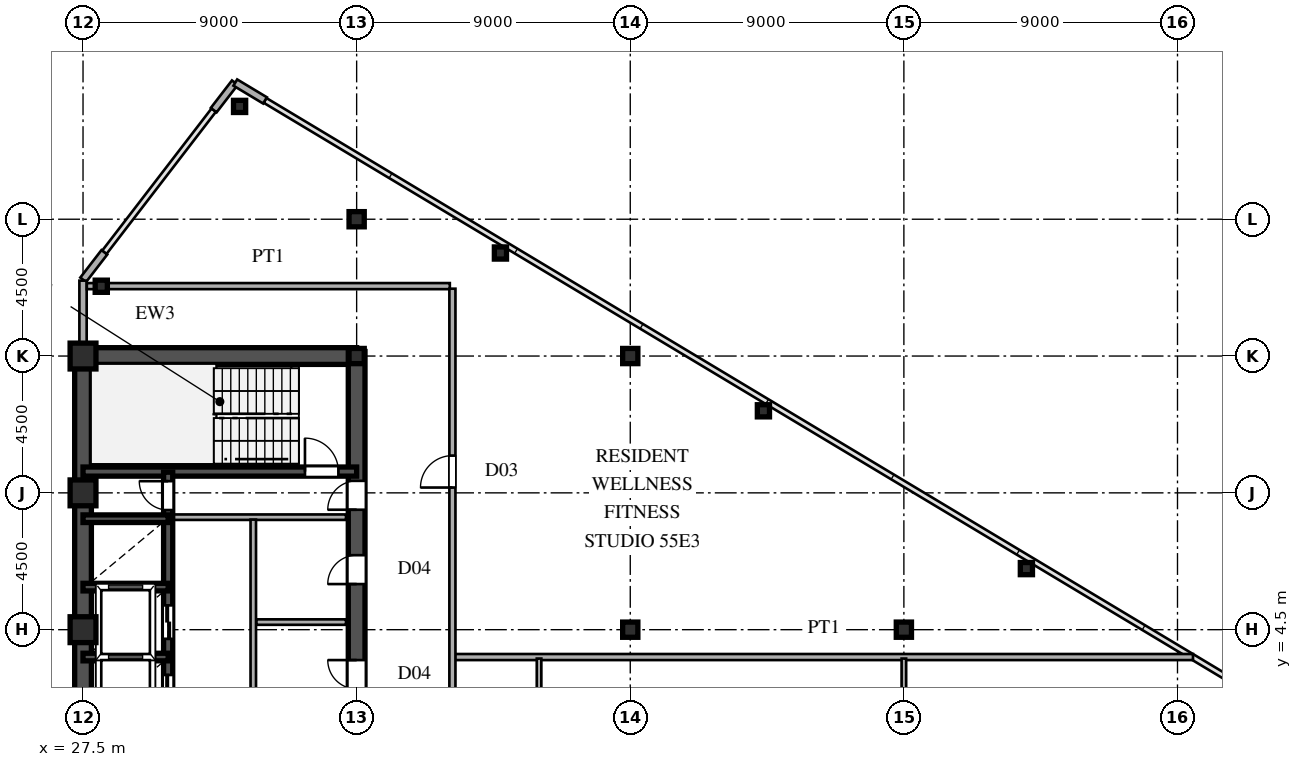
"""IFC4 building model, lengths in metres.
Left out: names, types, materials, properties, quantities, classifications, styles, units other than length and angle.
Written with IfcOpenShell. Run it as: python <this file> out.ifc"""

import sys

from ifc_helpers import new_model, si_unit, direction, frame, frame_2d, origin, origin_2d, place, context, subcontext, project, spatial, rectangle, hollow_rectangle, i_section, extrude, source, transform, mapped, element, fill, save


model = new_model("IFC4")
c1 = context("Model", 3, precision=1e-05, world=origin(), true_north=direction((0.0, 1.0)))
c2 = subcontext(c1, "Body", "Model", "MODEL_VIEW")
j1 = project(units=[si_unit("LENGTHUNIT", "METRE"), si_unit("PLANEANGLEUNIT", "RADIAN")], contexts=[c1])
p1 = place(None, origin())
s1 = spatial("IfcSite", under=j1, at=p1, CompositionType="ELEMENT")
p2 = place(p1, origin())
s2 = spatial("IfcBuilding", under=s1, at=p2, CompositionType="ELEMENT")
p3 = place(p2, frame((0.0, 0.0, 206.7)))
s3 = spatial("IfcBuildingStorey", under=s2, at=p3, CompositionType="ELEMENT", Elevation=206.7)
m1 = source(origin(), c2, "Body", "SweptSolid", [
    extrude(hollow_rectangle(XDim=0.85, YDim=0.85, WallThickness=0.036, at=origin_2d()), origin(), (0.0, 0.0, 1.0), 3.6),
])
for number, where, z_axis, x_axis in (
    (1, (27.5, 4.5, 0.0), (0.0, 0.0, 1.0), (1.0, 0.0, 0.0)),
    (2, (27.5, 9.0, 0.0), (0.0, 0.0, 1.0), (1.0, 0.0, 0.0)),
    (3, (27.5, 13.5, 0.0), (0.0, 0.0, 1.0), (1.0, 0.0, 0.0)),
):
    element("IfcColumn", number, at=place(p3, frame(where, z_axis=z_axis, x_axis=x_axis)), inside=s3, PredefinedType="COLUMN", context=c2, shape_type="MappedRepresentation", body=[
        mapped(m1, transform((0.0, 0.0, 0.0), scale=1.0)),
    ])
m2 = source(origin(), c2, "Body", "SweptSolid", [
    extrude(i_section(OverallWidth=0.5, OverallDepth=0.5, WebThickness=0.02, FlangeThickness=0.032, at=origin_2d()), origin(), (0.0, 0.0, 1.0), 3.6),
])
for number, where, z_axis, x_axis in (
    (4, (36.5, 13.5, 0.0), (0.0, 0.0, 1.0), (1.0, 0.0, 0.0)),
    (5, (36.5, 18.0, 0.0), (0.0, 0.0, 1.0), (1.0, 0.0, 0.0)),
    (6, (45.5, 4.5, 0.0), (0.0, 0.0, 1.0), (1.0, 0.0, 0.0)),
    (7, (45.5, 13.5, 0.0), (0.0, 0.0, 1.0), (1.0, 0.0, 0.0)),
    (8, (54.5, 4.5, 0.0), (0.0, 0.0, 1.0), (1.0, 0.0, 0.0)),
):
    element("IfcColumn", number, at=place(p3, frame(where, z_axis=z_axis, x_axis=x_axis)), inside=s3, PredefinedType="COLUMN", context=c2, shape_type="MappedRepresentation", body=[
        mapped(m2, transform((0.0, 0.0, 0.0), scale=1.0)),
    ])
m3 = source(origin(), c2, "Body", "SweptSolid", [
    extrude(hollow_rectangle(XDim=0.4, YDim=0.4, WallThickness=0.016, at=origin_2d()), origin(), (0.0, 0.0, 1.0), 3.6),
])
for number, where, z_axis, x_axis in (
    (9, (32.65, 21.71, 0.0), (0.0, 0.0, 1.0), (1.0, 0.0, 0.0)),
    (10, (28.1, 15.796, 0.0), (0.0, 0.0, 1.0), (1.0, 0.0, 0.0)),
    (11, (41.23, 16.889, 0.0), (0.0, 0.0, 1.0), (1.0, 0.0, 0.0)),
    (12, (49.88, 11.699, 0.0), (0.0, 0.0, 1.0), (1.0, 0.0, 0.0)),
    (13, (58.53, 6.509, 0.0), (0.0, 0.0, 1.0), (1.0, 0.0, 0.0)),
):
    element("IfcColumn", number, at=place(p3, frame(where, z_axis=z_axis, x_axis=x_axis)), inside=s3, PredefinedType="COLUMN", context=c2, shape_type="MappedRepresentation", body=[
        mapped(m3, transform((0.0, 0.0, 0.0), scale=1.0)),
    ])
for number, where, z_axis, x_axis in (
    (14, (33.486, 21.908, 0.0), (0.0, 0.0, 1.0), (-0.857, 0.515, 0.0)),
    (15, (32.494, 22.492, 0.0), (0.0, 0.0, 1.0), (-0.61, -0.793, 0.0)),
    (16, (28.201, 16.912, 0.0), (0.0, 0.0, 1.0), (-0.61, -0.793, 0.0)),
):
    element("IfcWall", number, at=place(p3, frame(where, z_axis=z_axis, x_axis=x_axis)), inside=s3, PredefinedType="SOLIDWALL", context=c2, shape_type="SweptSolid", body=[
        extrude(rectangle(XDim=1.14, YDim=0.24, at=frame_2d((0.57, 0.0))), origin(), (0.0, 0.0, 1.0), 3.38),
    ])
p4 = place(p3, frame((27.5, 13.78, 0.0), z_axis=(0.0, 0.0, 1.0), x_axis=(0.0, 1.0, 0.0)))
e17 = element("IfcWall", 17, at=p4, inside=s3, PredefinedType="SOLIDWALL", context=c2, shape_type="SweptSolid", body=[
    extrude(rectangle(XDim=0.6, YDim=0.24, at=frame_2d((0.3, 0.0))), origin(), (0.0, 0.0, 1.0), 2.88),
])
p5 = place(p3, frame((27.5, 14.38, 0.0), z_axis=(0.0, 0.0, 1.0), x_axis=(0.0, 1.0, 0.0)))
e18 = element("IfcWall", 18, at=p5, inside=s3, PredefinedType="SOLIDWALL", context=c2, shape_type="SweptSolid", body=[
    extrude(rectangle(XDim=1.6, YDim=0.24, at=frame_2d((0.8, 0.0))), origin(), (0.0, 0.0, 1.0), 3.38),
])
p6 = place(p3, frame((27.5, 1.3, 0.0), z_axis=(0.0, 0.0, 1.0), x_axis=(0.0, 1.0, 0.0)))
e19 = element("IfcWall", 19, at=p6, inside=s3, PredefinedType="SHEAR", context=c2, shape_type="SweptSolid", body=[
    extrude(rectangle(XDim=12.2, YDim=0.55, at=frame_2d((6.1, 0.0))), origin(), (0.0, 0.0, 1.0), 3.38),
])
p7 = place(p3, frame((27.5, 13.5, 0.0), z_axis=(0.0, 0.0, 1.0), x_axis=(1.0, 0.0, 0.0)))
e20 = element("IfcWall", 20, at=p7, inside=s3, PredefinedType="SHEAR", context=c2, shape_type="SweptSolid", body=[
    extrude(rectangle(XDim=9.0, YDim=0.55, at=frame_2d((4.5, 0.0))), origin(), (0.0, 0.0, 1.0), 3.38),
])
p8 = place(p3, frame((36.5, 8.2, 0.0), z_axis=(0.0, 0.0, 1.0), x_axis=(0.0, 1.0, 0.0)))
e21 = element("IfcWall", 21, at=p8, inside=s3, PredefinedType="SHEAR", context=c2, shape_type="SweptSolid", body=[
    extrude(rectangle(XDim=5.45, YDim=0.55, at=frame_2d((2.725, 0.0))), origin(), (0.0, 0.0, 1.0), 3.38),
])
p9 = place(p8, frame((0.245, 0.0, 0.0)))
e22 = element("IfcOpeningElement", 22, at=p9, cuts=e21, PredefinedType="OPENING", context=c2, shape_type="SweptSolid", body=[
    extrude(rectangle(XDim=0.95, YDim=2.15, at=frame_2d((0.475, 1.075))), frame((0.0, 0.285, 0.0), z_axis=(0.0, -1.0, 0.0), x_axis=(1.0, 0.0, 0.0)), (0.0, 0.0, 1.0), 0.57),
])
p10 = place(p3, frame((36.5, 1.3, 0.0), z_axis=(0.0, 0.0, 1.0), x_axis=(0.0, 1.0, 0.0)))
e23 = element("IfcWall", 23, at=p10, inside=s3, PredefinedType="SHEAR", context=c2, shape_type="SweptSolid", body=[
    extrude(rectangle(XDim=3.45, YDim=0.55, at=frame_2d((1.725, 0.0))), origin(), (0.0, 0.0, 1.0), 3.38),
])
p11 = place(p10, frame((1.25, 0.0, 0.0)))
e24 = element("IfcOpeningElement", 24, at=p11, cuts=e23, PredefinedType="OPENING", context=c2, shape_type="SweptSolid", body=[
    extrude(rectangle(XDim=0.95, YDim=2.15, at=frame_2d((0.475, 1.075))), frame((0.0, 0.285, 0.0), z_axis=(0.0, -1.0, 0.0), x_axis=(1.0, 0.0, 0.0)), (0.0, 0.0, 1.0), 0.57),
])
p12 = place(p3, frame((36.5, 4.75, 0.0), z_axis=(0.0, 0.0, 1.0), x_axis=(0.0, 1.0, 0.0)))
e25 = element("IfcWall", 25, at=p12, inside=s3, PredefinedType="SHEAR", context=c2, shape_type="SweptSolid", body=[
    extrude(rectangle(XDim=3.45, YDim=0.55, at=frame_2d((1.725, 0.0))), origin(), (0.0, 0.0, 1.0), 3.38),
])
p13 = place(p12, frame((1.25, 0.0, 0.0)))
e26 = element("IfcOpeningElement", 26, at=p13, cuts=e25, PredefinedType="OPENING", context=c2, shape_type="SweptSolid", body=[
    extrude(rectangle(XDim=0.95, YDim=2.15, at=frame_2d((0.475, 1.075))), frame((0.0, 0.285, 0.0), z_axis=(0.0, -1.0, 0.0), x_axis=(1.0, 0.0, 0.0)), (0.0, 0.0, 1.0), 0.57),
])
p14 = place(p3, frame((27.5, 9.7, 0.0), z_axis=(0.0, 0.0, 1.0), x_axis=(1.0, 0.0, 0.0)))
e27 = element("IfcWall", 27, at=p14, inside=s3, PredefinedType="SHEAR", context=c2, shape_type="SweptSolid", body=[
    extrude(rectangle(XDim=9.0, YDim=0.3, at=frame_2d((4.5, 0.0))), origin(), (0.0, 0.0, 1.0), 3.38),
])
p15 = place(p14, frame((7.3, 0.0, 0.0)))
e28 = element("IfcOpeningElement", 28, at=p15, cuts=e27, PredefinedType="OPENING", context=c2, shape_type="SweptSolid", body=[
    extrude(rectangle(XDim=1.1, YDim=2.2, at=frame_2d((0.55, 1.1))), frame((0.0, 0.16, 0.0), z_axis=(0.0, -1.0, 0.0), x_axis=(1.0, 0.0, 0.0)), (0.0, 0.0, 1.0), 0.32),
])
for number, where, z_axis, x_axis in (
    (29, (27.5, 3.6, 0.0), (0.0, 0.0, 1.0), (1.0, 0.0, 0.0)),
    (30, (27.5, 5.9, 0.0), (0.0, 0.0, 1.0), (1.0, 0.0, 0.0)),
    (31, (27.5, 8.15, 0.0), (0.0, 0.0, 1.0), (1.0, 0.0, 0.0)),
):
    element("IfcWall", number, at=place(p3, frame(where, z_axis=z_axis, x_axis=x_axis)), inside=s3, PredefinedType="SHEAR", context=c2, shape_type="SweptSolid", body=[
        extrude(rectangle(XDim=2.8, YDim=0.25, at=frame_2d((1.4, 0.0))), origin(), (0.0, 0.0, 1.0), 3.38),
    ])
p16 = place(p3, frame((30.3, 1.32, 0.0), z_axis=(0.0, 0.0, 1.0), x_axis=(0.0, 1.0, 0.0)))
e32 = element("IfcWall", 32, at=p16, inside=s3, PredefinedType="SHEAR", context=c2, shape_type="SweptSolid", body=[
    extrude(rectangle(XDim=2.28, YDim=0.3, at=frame_2d((1.14, 0.0))), origin(), (0.0, 0.0, 1.0), 3.38),
])
p17 = place(p16, frame((0.59, 0.0, 0.0)))
e33 = element("IfcOpeningElement", 33, at=p17, cuts=e32, PredefinedType="OPENING", context=c2, shape_type="SweptSolid", body=[
    extrude(rectangle(XDim=1.1, YDim=2.2, at=frame_2d((0.55, 1.1))), frame((0.0, 0.16, 0.0), z_axis=(0.0, -1.0, 0.0), x_axis=(1.0, 0.0, 0.0)), (0.0, 0.0, 1.0), 0.32),
])
p18 = place(p3, frame((30.3, 3.6, 0.0), z_axis=(0.0, 0.0, 1.0), x_axis=(0.0, 1.0, 0.0)))
e34 = element("IfcWall", 34, at=p18, inside=s3, PredefinedType="SHEAR", context=c2, shape_type="SweptSolid", body=[
    extrude(rectangle(XDim=2.3, YDim=0.3, at=frame_2d((1.15, 0.0))), origin(), (0.0, 0.0, 1.0), 3.38),
])
p19 = place(p18, frame((0.6, 0.0, 0.0)))
e35 = element("IfcOpeningElement", 35, at=p19, cuts=e34, PredefinedType="OPENING", context=c2, shape_type="SweptSolid", body=[
    extrude(rectangle(XDim=1.1, YDim=2.2, at=frame_2d((0.55, 1.1))), frame((0.0, 0.16, 0.0), z_axis=(0.0, -1.0, 0.0), x_axis=(1.0, 0.0, 0.0)), (0.0, 0.0, 1.0), 0.32),
])
p20 = place(p3, frame((30.3, 5.9, 0.0), z_axis=(0.0, 0.0, 1.0), x_axis=(0.0, 1.0, 0.0)))
e36 = element("IfcWall", 36, at=p20, inside=s3, PredefinedType="SHEAR", context=c2, shape_type="SweptSolid", body=[
    extrude(rectangle(XDim=2.25, YDim=0.3, at=frame_2d((1.125, 0.0))), origin(), (0.0, 0.0, 1.0), 3.38),
])
p21 = place(p3, frame((30.3, 8.15, 0.0), z_axis=(0.0, 0.0, 1.0), x_axis=(0.0, 1.0, 0.0)))
e37 = element("IfcWall", 37, at=p21, inside=s3, PredefinedType="SHEAR", context=c2, shape_type="SweptSolid", body=[
    extrude(rectangle(XDim=1.53, YDim=0.3, at=frame_2d((0.765, 0.0))), origin(), (0.0, 0.0, 1.0), 3.38),
])
p22 = place(p21, frame((0.285, 0.0, 0.0)))
e38 = element("IfcOpeningElement", 38, at=p22, cuts=e37, PredefinedType="OPENING", context=c2, shape_type="SweptSolid", body=[
    extrude(rectangle(XDim=0.95, YDim=2.15, at=frame_2d((0.475, 1.075))), frame((0.0, 0.16, 0.0), z_axis=(0.0, -1.0, 0.0), x_axis=(1.0, 0.0, 0.0)), (0.0, 0.0, 1.0), 0.32),
])
p23 = place(p3, frame((30.45, 8.2, 0.0), z_axis=(0.0, 0.0, 1.0), x_axis=(1.0, 0.0, 0.0)))
e39 = element("IfcWall", 39, at=p23, inside=s3, PredefinedType="PARTITIONING", context=c2, shape_type="SweptSolid", body=[
    extrude(rectangle(XDim=5.7, YDim=0.18, at=frame_2d((2.85, 0.0))), origin(), (0.0, 0.0, 1.0), 3.38),
])
p24 = place(p3, frame((33.1, 1.38, 0.0), z_axis=(0.0, 0.0, 1.0), x_axis=(0.0, 1.0, 0.0)))
e40 = element("IfcWall", 40, at=p24, inside=s3, PredefinedType="PARTITIONING", context=c2, shape_type="SweptSolid", body=[
    extrude(rectangle(XDim=6.74, YDim=0.18, at=frame_2d((3.37, 0.0))), origin(), (0.0, 0.0, 1.0), 3.38),
])
p25 = place(p3, frame((33.2, 4.75, 0.0), z_axis=(0.0, 0.0, 1.0), x_axis=(1.0, 0.0, 0.0)))
e41 = element("IfcWall", 41, at=p25, inside=s3, PredefinedType="PARTITIONING", context=c2, shape_type="SweptSolid", body=[
    extrude(rectangle(XDim=2.95, YDim=0.18, at=frame_2d((1.475, 0.0))), origin(), (0.0, 0.0, 1.0), 3.38),
])
p26 = place(p3, frame((39.73, 3.6, 0.0), z_axis=(0.0, 0.0, 1.0), x_axis=(1.0, 0.0, 0.0)))
e42 = element("IfcWall", 42, at=p26, inside=s3, PredefinedType="PARTITIONING", context=c2, shape_type="SweptSolid", body=[
    extrude(rectangle(XDim=24.28, YDim=0.2, at=frame_2d((12.14, 0.0))), origin(), (0.0, 0.0, 1.0), 3.38),
])
p27 = place(p3, frame((27.625, 15.8, 0.0), z_axis=(0.0, 0.0, 1.0), x_axis=(1.0, 0.0, 0.0)))
e43 = element("IfcWall", 43, at=p27, inside=s3, PredefinedType="PARTITIONING", context=c2, shape_type="SweptSolid", body=[
    extrude(rectangle(XDim=11.94, YDim=0.2, at=frame_2d((5.97, 0.0))), origin(), (0.0, 0.0, 1.0), 3.38),
])
p28 = place(p3, frame((39.65, -15.715, 0.0), z_axis=(0.0, 0.0, 1.0), x_axis=(0.0, 1.0, 0.0)))
e44 = element("IfcWall", 44, at=p28, inside=s3, PredefinedType="PARTITIONING", context=c2, shape_type="SweptSolid", body=[
    extrude(rectangle(XDim=31.43, YDim=0.2, at=frame_2d((15.715, 0.0))), origin(), (0.0, 0.0, 1.0), 3.38),
])
p29 = place(p28, frame((2.59, 0.0, 0.0)))
e45 = element("IfcOpeningElement", 45, at=p29, cuts=e44, PredefinedType="OPENING", context=c2, shape_type="SweptSolid", body=[
    extrude(rectangle(XDim=1.05, YDim=2.25, at=frame_2d((0.525, 1.125))), frame((0.0, 0.11, 0.0), z_axis=(0.0, -1.0, 0.0), x_axis=(1.0, 0.0, 0.0)), (0.0, 0.0, 1.0), 0.22),
])
p30 = place(p28, frame((12.095, 0.0, 0.0)))
e46 = element("IfcOpeningElement", 46, at=p30, cuts=e44, PredefinedType="OPENING", context=c2, shape_type="SweptSolid", body=[
    extrude(rectangle(XDim=1.05, YDim=2.25, at=frame_2d((0.525, 1.125))), frame((0.0, 0.11, 0.0), z_axis=(0.0, -1.0, 0.0), x_axis=(1.0, 0.0, 0.0)), (0.0, 0.0, 1.0), 0.22),
])
p31 = place(p28, frame((24.89, 0.0, 0.0)))
e47 = element("IfcOpeningElement", 47, at=p31, cuts=e44, PredefinedType="OPENING", context=c2, shape_type="SweptSolid", body=[
    extrude(rectangle(XDim=1.05, YDim=2.25, at=frame_2d((0.525, 1.125))), frame((0.0, 0.11, 0.0), z_axis=(0.0, -1.0, 0.0), x_axis=(1.0, 0.0, 0.0)), (0.0, 0.0, 1.0), 0.22),
])
p32 = place(p3, frame((42.5, -0.248, 0.0), z_axis=(0.0, 0.0, 1.0), x_axis=(0.0, 1.0, 0.0)))
e48 = element("IfcWall", 48, at=p32, inside=s3, PredefinedType="PARTITIONING", context=c2, shape_type="SweptSolid", body=[
    extrude(rectangle(XDim=3.798, YDim=0.15, at=frame_2d((1.899, 0.0))), origin(), (0.0, 0.0, 1.0), 3.38),
])
p33 = place(p3, frame((54.5, -9.335, 0.0), z_axis=(0.0, 0.0, 1.0), x_axis=(0.0, 1.0, 0.0)))
e49 = element("IfcWall", 49, at=p33, inside=s3, PredefinedType="PARTITIONING", context=c2, shape_type="SweptSolid", body=[
    extrude(rectangle(XDim=12.885, YDim=0.15, at=frame_2d((6.442, 0.0))), origin(), (0.0, 0.0, 1.0), 2.78),
])
p34 = place(p33, frame((5.96, 0.0, 0.0)))
e50 = element("IfcOpeningElement", 50, at=p34, cuts=e49, PredefinedType="OPENING", context=c2, shape_type="SweptSolid", body=[
    extrude(rectangle(XDim=0.95, YDim=2.15, at=frame_2d((0.475, 1.075))), frame((0.0, 0.085, 0.0), z_axis=(0.0, -1.0, 0.0), x_axis=(1.0, 0.0, 0.0)), (0.0, 0.0, 1.0), 0.17),
])
p35 = place(p33, frame((1.677, 0.0, 0.0)))
e51 = element("IfcOpeningElement", 51, at=p35, cuts=e49, PredefinedType="OPENING", context=c2, shape_type="SweptSolid", body=[
    extrude(rectangle(XDim=0.95, YDim=2.15, at=frame_2d((0.475, 1.075))), frame((0.0, 0.085, 0.0), z_axis=(0.0, -1.0, 0.0), x_axis=(1.0, 0.0, 0.0)), (0.0, 0.0, 1.0), 0.17),
])
p36 = place(p33, frame((10.293, 0.0, 0.0)))
e52 = element("IfcOpeningElement", 52, at=p36, cuts=e49, PredefinedType="OPENING", context=c2, shape_type="SweptSolid", body=[
    extrude(rectangle(XDim=0.95, YDim=2.15, at=frame_2d((0.475, 1.075))), frame((0.0, 0.085, 0.0), z_axis=(0.0, -1.0, 0.0), x_axis=(1.0, 0.0, 0.0)), (0.0, 0.0, 1.0), 0.17),
])
m4 = source(origin(), c2, "Body", "SweptSolid", [
    extrude(rectangle(XDim=0.95, YDim=2.15, at=frame_2d((0.475, 1.075))), frame((0.0, 0.025, 0.0), z_axis=(0.0, -1.0, 0.0), x_axis=(1.0, 0.0, 0.0)), (0.0, 0.0, 1.0), 0.05),
])
p37 = place(p9, origin())
e53 = element("IfcDoor", 53, at=p37, inside=s3, OperationType="SINGLE_SWING_LEFT", PredefinedType="DOOR", context=c2, shape_type="MappedRepresentation", body=[
    mapped(m4, transform((0.0, 0.0, 0.0), scale=1.0)),
])
fill(e22, e53)
p38 = place(p11, origin())
e54 = element("IfcDoor", 54, at=p38, inside=s3, OperationType="SINGLE_SWING_RIGHT", PredefinedType="DOOR", context=c2, shape_type="MappedRepresentation", body=[
    mapped(m4, transform((0.0, 0.0, 0.0), scale=1.0)),
])
fill(e24, e54)
p39 = place(p13, origin())
e55 = element("IfcDoor", 55, at=p39, inside=s3, OperationType="SINGLE_SWING_LEFT", PredefinedType="DOOR", context=c2, shape_type="MappedRepresentation", body=[
    mapped(m4, transform((0.0, 0.0, 0.0), scale=1.0)),
])
fill(e26, e55)
m5 = source(origin(), c2, "Body", "SweptSolid", [
    extrude(rectangle(XDim=1.1, YDim=2.2, at=frame_2d((0.55, 1.1))), frame((0.0, 0.025, 0.0), z_axis=(0.0, -1.0, 0.0), x_axis=(1.0, 0.0, 0.0)), (0.0, 0.0, 1.0), 0.05),
])
p40 = place(p15, origin())
e56 = element("IfcDoor", 56, at=p40, inside=s3, OperationType="SINGLE_SWING_LEFT", PredefinedType="DOOR", context=c2, shape_type="MappedRepresentation", body=[
    mapped(m5, transform((0.0, 0.0, 0.0), scale=1.0)),
])
fill(e28, e56)
m6 = source(origin(), c2, "Body", "SweptSolid", [
    extrude(rectangle(XDim=1.1, YDim=2.2, at=frame_2d((0.55, 1.1))), frame((0.0, 0.025, 0.0), z_axis=(0.0, -1.0, 0.0), x_axis=(1.0, 0.0, 0.0)), (0.0, 0.0, 1.0), 0.05),
])
p41 = place(p17, origin())
e57 = element("IfcDoor", 57, at=p41, inside=s3, OperationType="DOUBLE_DOOR_SLIDING", PredefinedType="DOOR", context=c2, shape_type="MappedRepresentation", body=[
    mapped(m6, transform((0.0, 0.0, 0.0), scale=1.0)),
])
fill(e33, e57)
p42 = place(p19, origin())
e58 = element("IfcDoor", 58, at=p42, inside=s3, OperationType="DOUBLE_DOOR_SLIDING", PredefinedType="DOOR", context=c2, shape_type="MappedRepresentation", body=[
    mapped(m6, transform((0.0, 0.0, 0.0), scale=1.0)),
])
fill(e35, e58)
p43 = place(p22, origin())
e59 = element("IfcDoor", 59, at=p43, inside=s3, OperationType="SINGLE_SWING_RIGHT", PredefinedType="DOOR", context=c2, shape_type="MappedRepresentation", body=[
    mapped(m4, transform((0.0, 0.0, 0.0), scale=1.0)),
])
fill(e38, e59)
m7 = source(origin(), c2, "Body", "SweptSolid", [
    extrude(rectangle(XDim=1.05, YDim=2.25, at=frame_2d((0.525, 1.125))), frame((0.0, 0.025, 0.0), z_axis=(0.0, -1.0, 0.0), x_axis=(1.0, 0.0, 0.0)), (0.0, 0.0, 1.0), 0.05),
])
p44 = place(p31, origin())
e60 = element("IfcDoor", 60, at=p44, inside=s3, OperationType="SINGLE_SWING_LEFT", PredefinedType="DOOR", context=c2, shape_type="MappedRepresentation", body=[
    mapped(m7, transform((0.0, 0.0, 0.0), scale=1.0)),
])
fill(e47, e60)
save(model, sys.argv[1])
